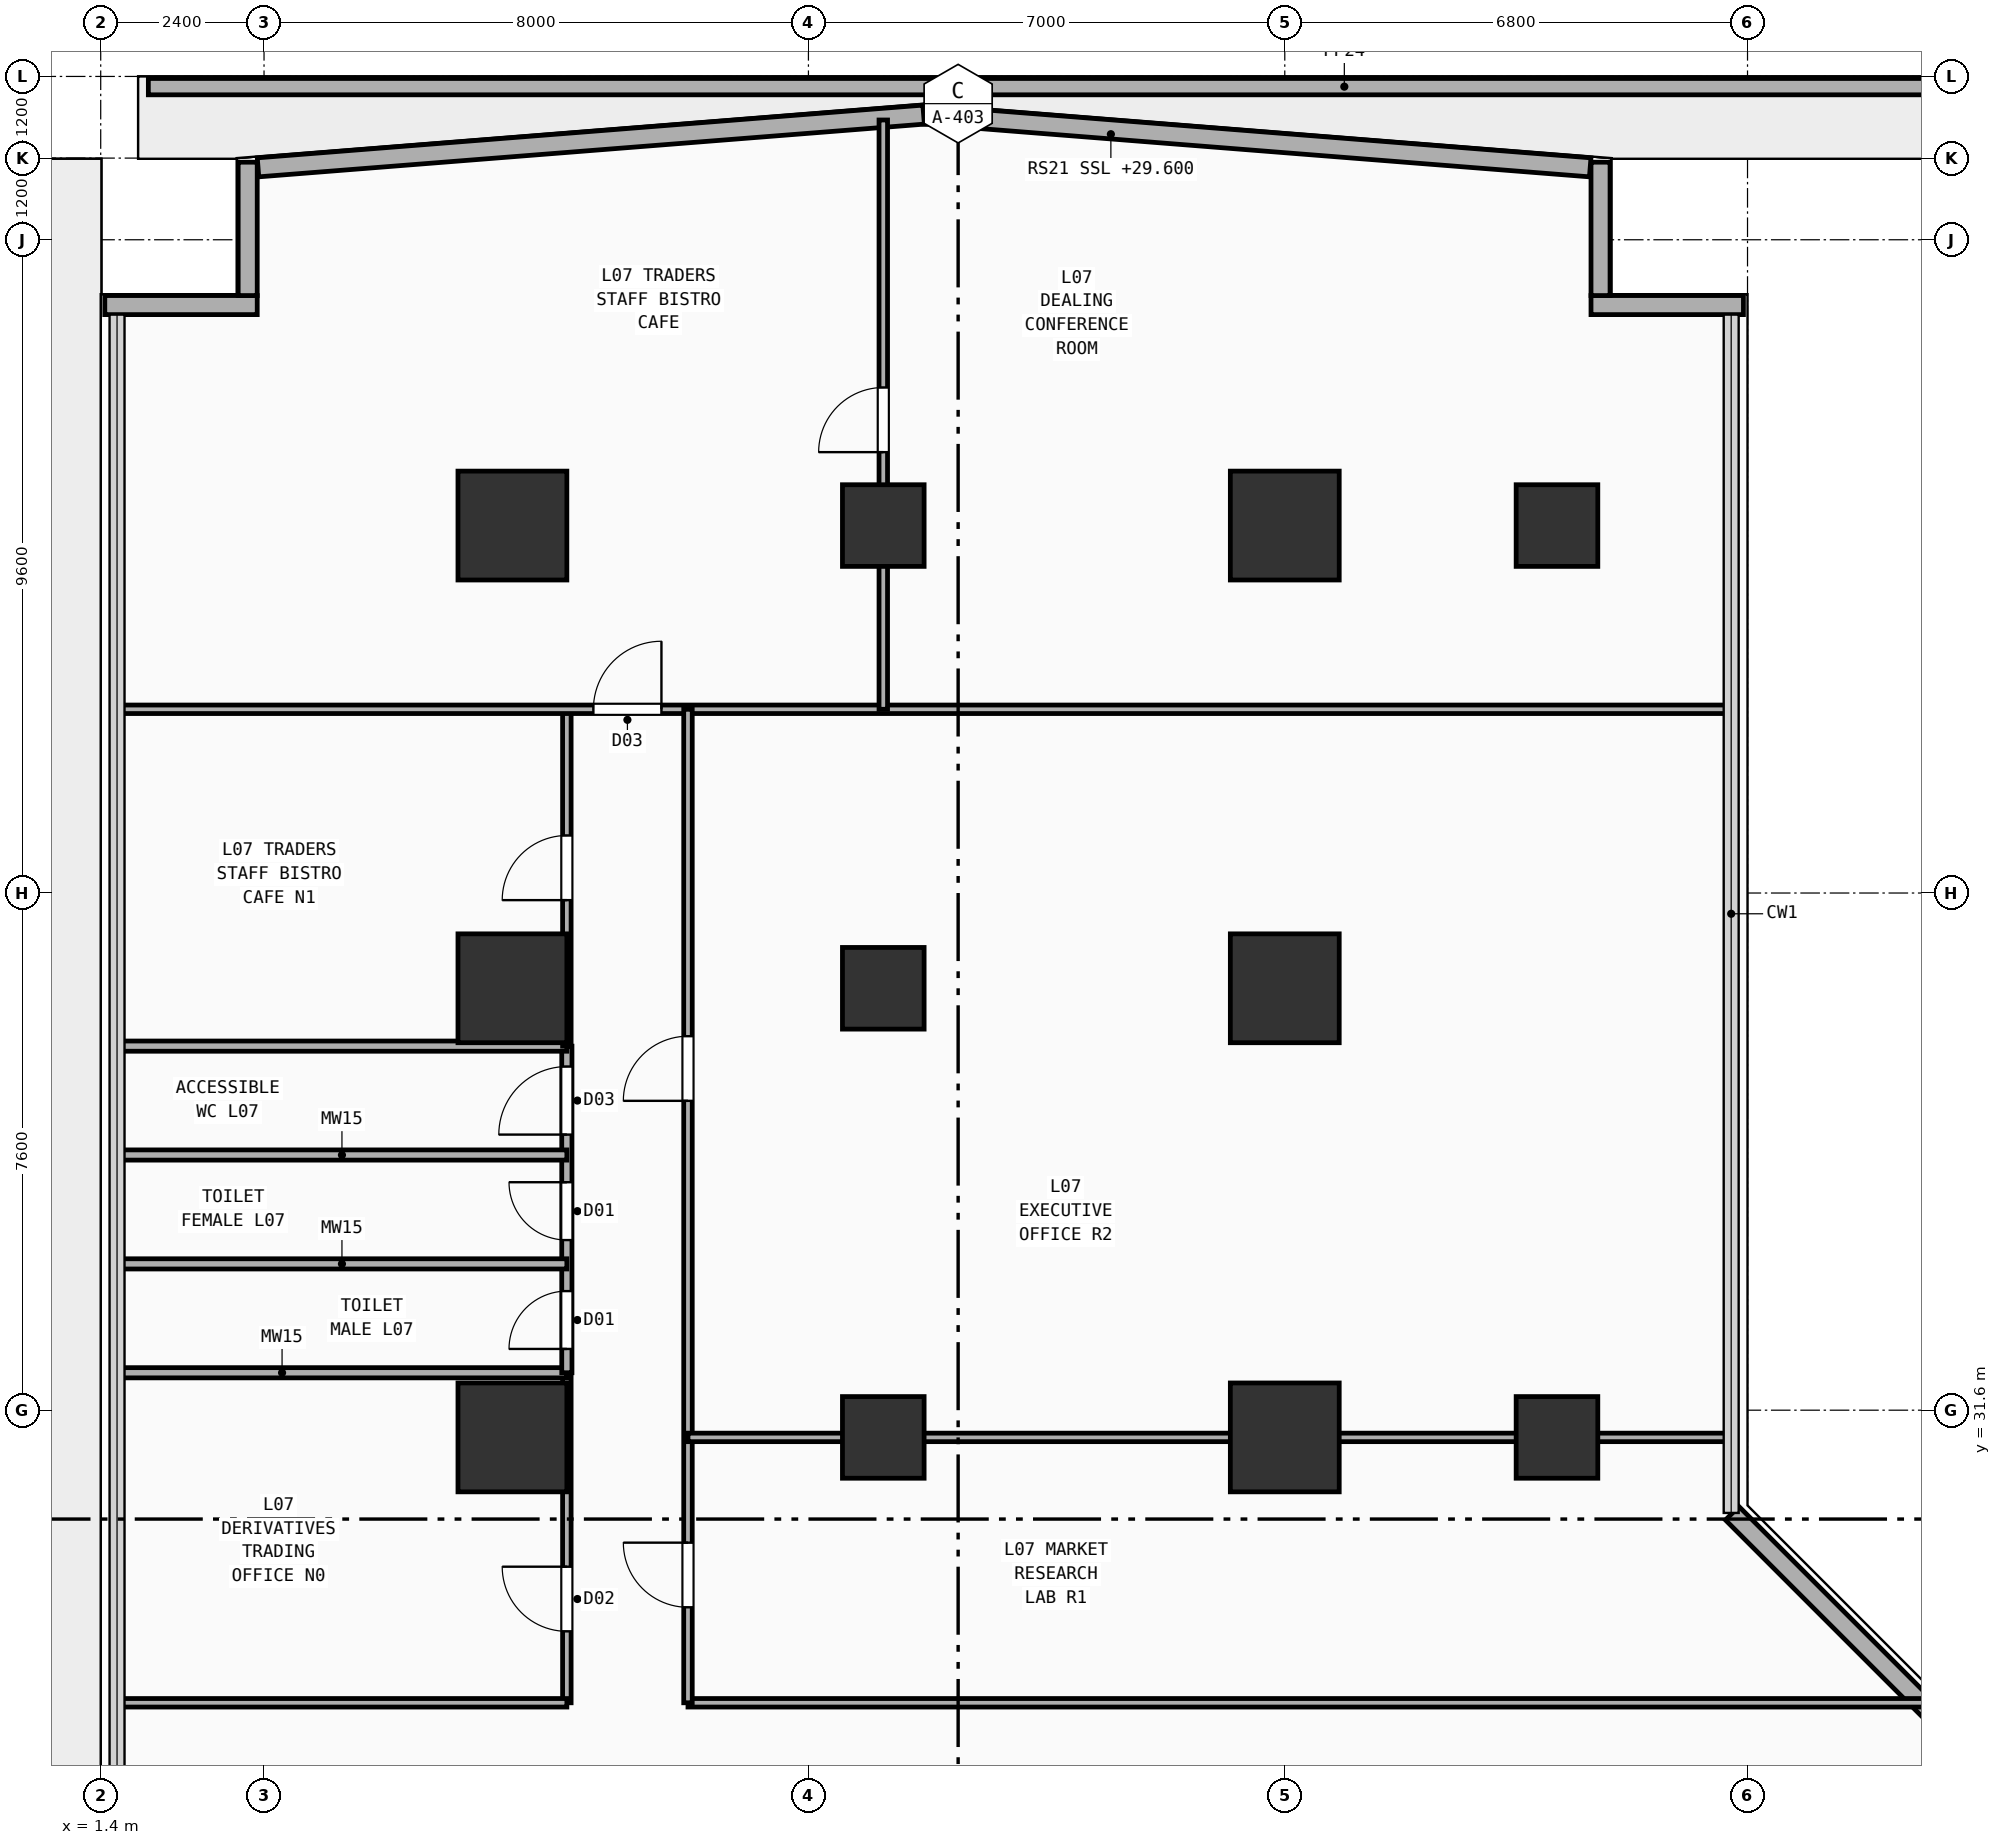
"""IFC4 building model, lengths in metres.
Left out: names, types, materials, properties, quantities, classifications, styles, units other than length and angle.
Written with IfcOpenShell. Run it as: python <this file> out.ifc"""

import sys

from ifc_helpers import new_model, si_unit, direction, frame, frame_2d, origin, origin_2d, place, context, subcontext, project, spatial, rectangle, extrude, element, fill, save


model = new_model("IFC4")
c1 = context("Model", 3, precision=1e-05, world=origin(), true_north=direction((0.0, 1.0)))
c2 = subcontext(c1, "Body", "Model", "MODEL_VIEW")
j1 = project(units=[si_unit("LENGTHUNIT", "METRE"), si_unit("PLANEANGLEUNIT", "RADIAN")], contexts=[c1])
p1 = place(None, origin())
s1 = spatial("IfcSite", under=j1, at=p1, CompositionType="ELEMENT")
p2 = place(p1, origin())
s2 = spatial("IfcBuilding", under=s1, at=p2, CompositionType="ELEMENT")
p3 = place(p2, frame((0.0, 0.0, 29.6)))
s3 = spatial("IfcBuildingStorey", under=s2, at=p3, CompositionType="ELEMENT", Elevation=29.6)
for number, where, z_axis, x_axis in (
    (1, (7.45, 31.2, 0.0), (0.0, 0.0, 1.0), (1.0, 0.0, 0.0)),
    (2, (7.45, 37.8, 0.0), (0.0, 0.0, 1.0), (1.0, 0.0, 0.0)),
    (3, (7.45, 44.6, 0.0), (0.0, 0.0, 1.0), (1.0, 0.0, 0.0)),
    (4, (18.8, 31.2, 0.0), (0.0, 0.0, 1.0), (1.0, 0.0, 0.0)),
    (5, (18.8, 37.8, 0.0), (0.0, 0.0, 1.0), (1.0, 0.0, 0.0)),
    (6, (18.8, 44.6, 0.0), (0.0, 0.0, 1.0), (1.0, 0.0, 0.0)),
):
    element("IfcColumn", number, at=place(p3, frame(where, z_axis=z_axis, x_axis=x_axis)), inside=s3, PredefinedType="COLUMN", context=c2, shape_type="SweptSolid", body=[
        extrude(rectangle(XDim=1.6, YDim=1.6, at=origin_2d()), origin(), (0.0, 0.0, 1.0), 3.54),
    ])
for number, where, z_axis, x_axis in (
    (7, (22.8, 31.2, 0.0), (0.0, 0.0, 1.0), (1.0, 0.0, 0.0)),
    (8, (22.8, 44.6, 0.0), (0.0, 0.0, 1.0), (1.0, 0.0, 0.0)),
):
    element("IfcColumn", number, at=place(p3, frame(where, z_axis=z_axis, x_axis=x_axis)), inside=s3, PredefinedType="COLUMN", context=c2, shape_type="SweptSolid", body=[
        extrude(rectangle(XDim=1.2, YDim=1.2, at=origin_2d()), origin(), (0.0, 0.0, 1.0), 3.54),
    ])
for number, where, z_axis, x_axis in (
    (9, (12.9, 31.2, -0.45), (0.0, 0.0, 1.0), (1.0, 0.0, 0.0)),
    (10, (12.9, 37.8, -0.45), (0.0, 0.0, 1.0), (1.0, 0.0, 0.0)),
    (11, (12.9, 44.6, -0.45), (0.0, 0.0, 1.0), (1.0, 0.0, 0.0)),
):
    element("IfcColumn", number, at=place(p3, frame(where, z_axis=z_axis, x_axis=x_axis)), inside=s3, PredefinedType="COLUMN", context=c2, shape_type="SweptSolid", body=[
        extrude(rectangle(XDim=1.2, YDim=1.2, at=origin_2d()), origin(), (0.0, 0.0, 1.0), 3.99),
    ])
p4 = place(p3, frame((2.1, 51.05, 0.0), z_axis=(0.0, 0.0, 1.0), x_axis=(1.0, 0.0, 0.0)))
e12 = element("IfcWall", 12, at=p4, inside=s3, PredefinedType="PARAPET", context=c2, shape_type="SweptSolid", body=[
    extrude(rectangle(XDim=35.15, YDim=0.24, at=frame_2d((17.575, 0.0))), origin(), (0.0, 0.0, 1.0), 0.42),
])
p5 = place(p3, frame((23.3, 47.84, 0.0), z_axis=(0.0, 0.0, 1.0), x_axis=(1.0, 0.0, 0.0)))
e13 = element("IfcWall", 13, at=p5, inside=s3, PredefinedType="SOLIDWALL", context=c2, shape_type="SweptSolid", body=[
    extrude(rectangle(XDim=2.24, YDim=0.28, at=frame_2d((1.12, 0.0))), origin(), (0.0, 0.0, 1.0), 3.54),
])
p6 = place(p3, frame((23.44, 47.98, 0.0), z_axis=(0.0, 0.0, 1.0), x_axis=(0.0, 1.0, 0.0)))
e14 = element("IfcWall", 14, at=p6, inside=s3, PredefinedType="SOLIDWALL", context=c2, shape_type="SweptSolid", body=[
    extrude(rectangle(XDim=1.96, YDim=0.28, at=frame_2d((0.98, 0.0))), origin(), (0.0, 0.0, 1.0), 3.54),
])
p7 = place(p3, frame((1.46, 47.84, 0.0), z_axis=(0.0, 0.0, 1.0), x_axis=(1.0, 0.0, 0.0)))
e15 = element("IfcWall", 15, at=p7, inside=s3, PredefinedType="SOLIDWALL", context=c2, shape_type="SweptSolid", body=[
    extrude(rectangle(XDim=2.24, YDim=0.28, at=frame_2d((1.12, 0.0))), origin(), (0.0, 0.0, 1.0), 3.54),
])
p8 = place(p3, frame((3.56, 47.98, 0.0), z_axis=(0.0, 0.0, 1.0), x_axis=(0.0, 1.0, 0.0)))
e16 = element("IfcWall", 16, at=p8, inside=s3, PredefinedType="SOLIDWALL", context=c2, shape_type="SweptSolid", body=[
    extrude(rectangle(XDim=1.96, YDim=0.28, at=frame_2d((0.98, 0.0))), origin(), (0.0, 0.0, 1.0), 3.54),
])
p9 = place(p3, frame((31.885, 23.575, 0.0), z_axis=(0.0, 0.0, 1.0), x_axis=(-0.707106781187, 0.707106781187, 0.0)))
e17 = element("IfcWall", 17, at=p9, inside=s3, PredefinedType="SOLIDWALL", context=c2, shape_type="SweptSolid", body=[
    extrude(rectangle(XDim=9.207, YDim=0.28, at=frame_2d((4.603, 0.0))), origin(), (0.0, 0.0, 1.0), 3.54),
])
for number, where, z_axis, x_axis in (
    (18, (23.288, 49.864, 0.0), (0.0, 0.0, 1.0), (-0.997, 0.079, 0.0)),
    (19, (13.493, 50.639, 0.0), (0.0, 0.0, 1.0), (-0.997, -0.079, 0.0)),
):
    element("IfcWall", number, at=place(p3, frame(where, z_axis=z_axis, x_axis=x_axis)), inside=s3, PredefinedType="SOLIDWALL", context=c2, shape_type="SweptSolid", body=[
        extrude(rectangle(XDim=9.812, YDim=0.28, at=frame_2d((4.906, 0.0))), origin(), (0.0, 0.0, 1.0), 3.54),
    ])
p10 = place(p3, frame((8.25, 27.3, 0.0), z_axis=(0.0, 0.0, 1.0), x_axis=(0.0, 1.0, 0.0)))
e20 = element("IfcWall", 20, at=p10, inside=s3, PredefinedType="PARTITIONING", context=c2, shape_type="SweptSolid", body=[
    extrude(rectangle(XDim=4.85, YDim=0.125, at=frame_2d((2.425, 0.0))), origin(), (0.0, 0.0, 1.0), 3.54),
])
p11 = place(p10, frame((1.05, 0.0, 0.0)))
e21 = element("IfcOpeningElement", 21, at=p11, cuts=e20, PredefinedType="OPENING", context=c2, shape_type="SweptSolid", body=[
    extrude(rectangle(XDim=0.95, YDim=2.15, at=frame_2d((0.475, 1.075))), frame((0.0, 0.073, 0.0), z_axis=(0.0, -1.0, 0.0), x_axis=(1.0, 0.0, 0.0)), (0.0, 0.0, 1.0), 0.145),
])
p12 = place(p3, frame((1.64, 27.3, 0.0), z_axis=(0.0, 0.0, 1.0), x_axis=(1.0, 0.0, 0.0)))
e22 = element("IfcWall", 22, at=p12, inside=s3, PredefinedType="PARTITIONING", context=c2, shape_type="SweptSolid", body=[
    extrude(rectangle(XDim=6.61, YDim=0.125, at=frame_2d((3.305, 0.0))), origin(), (0.0, 0.0, 1.0), 3.54),
])
p13 = place(p3, frame((1.64, 32.15, 0.0), z_axis=(0.0, 0.0, 1.0), x_axis=(1.0, 0.0, 0.0)))
e23 = element("IfcWall", 23, at=p13, inside=s3, PredefinedType="PLUMBINGWALL", context=c2, shape_type="SweptSolid", body=[
    extrude(rectangle(XDim=6.61, YDim=0.15, at=frame_2d((3.305, 0.0))), origin(), (0.0, 0.0, 1.0), 3.54),
])
p14 = place(p3, frame((8.25, 32.15, 0.0), z_axis=(0.0, 0.0, 1.0), x_axis=(0.0, 1.0, 0.0)))
e24 = element("IfcWall", 24, at=p14, inside=s3, PredefinedType="PLUMBINGWALL", context=c2, shape_type="SweptSolid", body=[
    extrude(rectangle(XDim=4.8, YDim=0.15, at=frame_2d((2.4, 0.0))), origin(), (0.0, 0.0, 1.0), 3.54),
])
p15 = place(p14, frame((0.35, 0.0, 0.0)))
e25 = element("IfcOpeningElement", 25, at=p15, cuts=e24, PredefinedType="OPENING", context=c2, shape_type="SweptSolid", body=[
    extrude(rectangle(XDim=0.85, YDim=2.15, at=frame_2d((0.425, 1.075))), frame((0.0, 0.085, 0.0), z_axis=(0.0, -1.0, 0.0), x_axis=(1.0, 0.0, 0.0)), (0.0, 0.0, 1.0), 0.17),
])
p16 = place(p14, frame((1.95, 0.0, 0.0)))
e26 = element("IfcOpeningElement", 26, at=p16, cuts=e24, PredefinedType="OPENING", context=c2, shape_type="SweptSolid", body=[
    extrude(rectangle(XDim=0.85, YDim=2.15, at=frame_2d((0.425, 1.075))), frame((0.0, 0.085, 0.0), z_axis=(0.0, -1.0, 0.0), x_axis=(1.0, 0.0, 0.0)), (0.0, 0.0, 1.0), 0.17),
])
p17 = place(p14, frame((3.5, 0.0, 0.0)))
e27 = element("IfcOpeningElement", 27, at=p17, cuts=e24, PredefinedType="OPENING", context=c2, shape_type="SweptSolid", body=[
    extrude(rectangle(XDim=1.0, YDim=2.2, at=frame_2d((0.5, 1.1))), frame((0.0, 0.085, 0.0), z_axis=(0.0, -1.0, 0.0), x_axis=(1.0, 0.0, 0.0)), (0.0, 0.0, 1.0), 0.17),
])
for number, where, z_axis, x_axis in (
    (28, (1.64, 33.75, 0.0), (0.0, 0.0, 1.0), (1.0, 0.0, 0.0)),
    (29, (1.64, 35.35, 0.0), (0.0, 0.0, 1.0), (1.0, 0.0, 0.0)),
):
    element("IfcWall", number, at=place(p3, frame(where, z_axis=z_axis, x_axis=x_axis)), inside=s3, PredefinedType="PLUMBINGWALL", context=c2, shape_type="SweptSolid", body=[
        extrude(rectangle(XDim=6.61, YDim=0.15, at=frame_2d((3.305, 0.0))), origin(), (0.0, 0.0, 1.0), 3.04),
    ])
p18 = place(p3, frame((1.64, 36.95, 0.0), z_axis=(0.0, 0.0, 1.0), x_axis=(1.0, 0.0, 0.0)))
e30 = element("IfcWall", 30, at=p18, inside=s3, PredefinedType="PLUMBINGWALL", context=c2, shape_type="SweptSolid", body=[
    extrude(rectangle(XDim=6.61, YDim=0.15, at=frame_2d((3.305, 0.0))), origin(), (0.0, 0.0, 1.0), 3.54),
])
p19 = place(p3, frame((8.25, 36.95, 0.0), z_axis=(0.0, 0.0, 1.0), x_axis=(0.0, 1.0, 0.0)))
e31 = element("IfcWall", 31, at=p19, inside=s3, PredefinedType="PARTITIONING", context=c2, shape_type="SweptSolid", body=[
    extrude(rectangle(XDim=4.95, YDim=0.125, at=frame_2d((2.475, 0.0))), origin(), (0.0, 0.0, 1.0), 3.54),
])
p20 = place(p19, frame((2.146, 0.0, 0.0)))
e32 = element("IfcOpeningElement", 32, at=p20, cuts=e31, PredefinedType="OPENING", context=c2, shape_type="SweptSolid", body=[
    extrude(rectangle(XDim=0.95, YDim=2.15, at=frame_2d((0.475, 1.075))), frame((0.0, 0.073, 0.0), z_axis=(0.0, -1.0, 0.0), x_axis=(1.0, 0.0, 0.0)), (0.0, 0.0, 1.0), 0.145),
])
p21 = place(p3, frame((1.64, 41.9, 0.0), z_axis=(0.0, 0.0, 1.0), x_axis=(1.0, 0.0, 0.0)))
e33 = element("IfcWall", 33, at=p21, inside=s3, PredefinedType="PARTITIONING", context=c2, shape_type="SweptSolid", body=[
    extrude(rectangle(XDim=23.72, YDim=0.125, at=frame_2d((11.86, 0.0))), origin(), (0.0, 0.0, 1.0), 3.54),
])
p22 = place(p21, frame((7.0, 0.0, 0.0)))
e34 = element("IfcOpeningElement", 34, at=p22, cuts=e33, PredefinedType="OPENING", context=c2, shape_type="SweptSolid", body=[
    extrude(rectangle(XDim=1.0, YDim=2.2, at=frame_2d((0.5, 1.1))), frame((0.0, 0.073, 0.0), z_axis=(0.0, -1.0, 0.0), x_axis=(1.0, 0.0, 0.0)), (0.0, 0.0, 1.0), 0.145),
])
p23 = place(p3, frame((12.9, 41.9, 0.0), z_axis=(0.0, 0.0, 1.0), x_axis=(0.0, 1.0, 0.0)))
e35 = element("IfcWall", 35, at=p23, inside=s3, PredefinedType="PARTITIONING", context=c2, shape_type="SweptSolid", body=[
    extrude(rectangle(XDim=8.66, YDim=0.125, at=frame_2d((4.33, 0.0))), origin(), (0.0, 0.0, 1.0), 2.63),
])
p24 = place(p23, frame((3.779, 0.0, 0.0)))
e36 = element("IfcOpeningElement", 36, at=p24, cuts=e35, PredefinedType="OPENING", context=c2, shape_type="SweptSolid", body=[
    extrude(rectangle(XDim=0.95, YDim=2.15, at=frame_2d((0.475, 1.075))), frame((0.0, 0.073, 0.0), z_axis=(0.0, -1.0, 0.0), x_axis=(1.0, 0.0, 0.0)), (0.0, 0.0, 1.0), 0.145),
])
p25 = place(p3, frame((10.03, 27.3, 0.0), z_axis=(0.0, 0.0, 1.0), x_axis=(1.0, 0.0, 0.0)))
e37 = element("IfcWall", 37, at=p25, inside=s3, PredefinedType="PARTITIONING", context=c2, shape_type="SweptSolid", body=[
    extrude(rectangle(XDim=18.23, YDim=0.125, at=frame_2d((9.115, 0.0))), origin(), (0.0, 0.0, 1.0), 3.54),
])
p26 = place(p3, frame((10.03, 27.3, 0.0), z_axis=(0.0, 0.0, 1.0), x_axis=(0.0, 1.0, 0.0)))
e38 = element("IfcWall", 38, at=p26, inside=s3, PredefinedType="PARTITIONING", context=c2, shape_type="SweptSolid", body=[
    extrude(rectangle(XDim=14.6, YDim=0.125, at=frame_2d((7.3, 0.0))), origin(), (0.0, 0.0, 1.0), 3.54),
])
p27 = place(p26, frame((1.403, 0.0, 0.0)))
e39 = element("IfcOpeningElement", 39, at=p27, cuts=e38, PredefinedType="OPENING", context=c2, shape_type="SweptSolid", body=[
    extrude(rectangle(XDim=0.95, YDim=2.15, at=frame_2d((0.475, 1.075))), frame((0.0, 0.073, 0.0), z_axis=(0.0, -1.0, 0.0), x_axis=(1.0, 0.0, 0.0)), (0.0, 0.0, 1.0), 0.145),
])
p28 = place(p26, frame((8.846, 0.0, 0.0)))
e40 = element("IfcOpeningElement", 40, at=p28, cuts=e38, PredefinedType="OPENING", context=c2, shape_type="SweptSolid", body=[
    extrude(rectangle(XDim=0.95, YDim=2.15, at=frame_2d((0.475, 1.075))), frame((0.0, 0.073, 0.0), z_axis=(0.0, -1.0, 0.0), x_axis=(1.0, 0.0, 0.0)), (0.0, 0.0, 1.0), 0.145),
])
p29 = place(p3, frame((10.03, 31.2, 0.0), z_axis=(0.0, 0.0, 1.0), x_axis=(1.0, 0.0, 0.0)))
e41 = element("IfcWall", 41, at=p29, inside=s3, PredefinedType="PARTITIONING", context=c2, shape_type="SweptSolid", body=[
    extrude(rectangle(XDim=15.33, YDim=0.125, at=frame_2d((7.665, 0.0))), origin(), (0.0, 0.0, 1.0), 2.63),
])
p30 = place(p11, origin())
e42 = element("IfcDoor", 42, at=p30, inside=s3, OperationType="SINGLE_SWING_RIGHT", PredefinedType="DOOR", context=c2, shape_type="SweptSolid", body=[
    extrude(rectangle(XDim=0.95, YDim=2.15, at=frame_2d((0.475, 1.075))), frame((0.0, 0.025, 0.0), z_axis=(0.0, -1.0, 0.0), x_axis=(1.0, 0.0, 0.0)), (0.0, 0.0, 1.0), 0.05),
])
fill(e21, e42)
p31 = place(p15, origin())
e43 = element("IfcDoor", 43, at=p31, inside=s3, OperationType="SINGLE_SWING_LEFT", PredefinedType="DOOR", context=c2, shape_type="SweptSolid", body=[
    extrude(rectangle(XDim=0.85, YDim=2.15, at=frame_2d((0.425, 1.075))), frame((0.0, 0.025, 0.0), z_axis=(0.0, -1.0, 0.0), x_axis=(1.0, 0.0, 0.0)), (0.0, 0.0, 1.0), 0.05),
])
fill(e25, e43)
p32 = place(p16, origin())
e44 = element("IfcDoor", 44, at=p32, inside=s3, OperationType="SINGLE_SWING_RIGHT", PredefinedType="DOOR", context=c2, shape_type="SweptSolid", body=[
    extrude(rectangle(XDim=0.85, YDim=2.15, at=frame_2d((0.425, 1.075))), frame((0.0, 0.025, 0.0), z_axis=(0.0, -1.0, 0.0), x_axis=(1.0, 0.0, 0.0)), (0.0, 0.0, 1.0), 0.05),
])
fill(e26, e44)
p33 = place(p17, origin())
e45 = element("IfcDoor", 45, at=p33, inside=s3, OperationType="SINGLE_SWING_LEFT", PredefinedType="DOOR", context=c2, shape_type="SweptSolid", body=[
    extrude(rectangle(XDim=1.0, YDim=2.2, at=frame_2d((0.5, 1.1))), frame((0.0, 0.025, 0.0), z_axis=(0.0, -1.0, 0.0), x_axis=(1.0, 0.0, 0.0)), (0.0, 0.0, 1.0), 0.05),
])
fill(e27, e45)
p34 = place(p20, origin())
e46 = element("IfcDoor", 46, at=p34, inside=s3, OperationType="SINGLE_SWING_LEFT", PredefinedType="DOOR", context=c2, shape_type="SweptSolid", body=[
    extrude(rectangle(XDim=0.95, YDim=2.15, at=frame_2d((0.475, 1.075))), frame((0.0, 0.025, 0.0), z_axis=(0.0, -1.0, 0.0), x_axis=(1.0, 0.0, 0.0)), (0.0, 0.0, 1.0), 0.05),
])
fill(e32, e46)
p35 = place(p22, origin())
e47 = element("IfcDoor", 47, at=p35, inside=s3, OperationType="SINGLE_SWING_RIGHT", PredefinedType="DOOR", context=c2, shape_type="SweptSolid", body=[
    extrude(rectangle(XDim=1.0, YDim=2.2, at=frame_2d((0.5, 1.1))), frame((0.0, 0.025, 0.0), z_axis=(0.0, -1.0, 0.0), x_axis=(1.0, 0.0, 0.0)), (0.0, 0.0, 1.0), 0.05),
])
fill(e34, e47)
p36 = place(p24, origin())
e48 = element("IfcDoor", 48, at=p36, inside=s3, OperationType="SINGLE_SWING_LEFT", PredefinedType="DOOR", context=c2, shape_type="SweptSolid", body=[
    extrude(rectangle(XDim=0.95, YDim=2.15, at=frame_2d((0.475, 1.075))), frame((0.0, 0.025, 0.0), z_axis=(0.0, -1.0, 0.0), x_axis=(1.0, 0.0, 0.0)), (0.0, 0.0, 1.0), 0.05),
])
fill(e36, e48)
p37 = place(p27, origin())
e49 = element("IfcDoor", 49, at=p37, inside=s3, OperationType="SINGLE_SWING_RIGHT", PredefinedType="DOOR", context=c2, shape_type="SweptSolid", body=[
    extrude(rectangle(XDim=0.95, YDim=2.15, at=frame_2d((0.475, 1.075))), frame((0.0, 0.025, 0.0), z_axis=(0.0, -1.0, 0.0), x_axis=(1.0, 0.0, 0.0)), (0.0, 0.0, 1.0), 0.05),
])
fill(e39, e49)
p38 = place(p28, origin())
e50 = element("IfcDoor", 50, at=p38, inside=s3, OperationType="SINGLE_SWING_LEFT", PredefinedType="DOOR", context=c2, shape_type="SweptSolid", body=[
    extrude(rectangle(XDim=0.95, YDim=2.15, at=frame_2d((0.475, 1.075))), frame((0.0, 0.025, 0.0), z_axis=(0.0, -1.0, 0.0), x_axis=(1.0, 0.0, 0.0)), (0.0, 0.0, 1.0), 0.05),
])
fill(e40, e50)
save(model, sys.argv[1])
